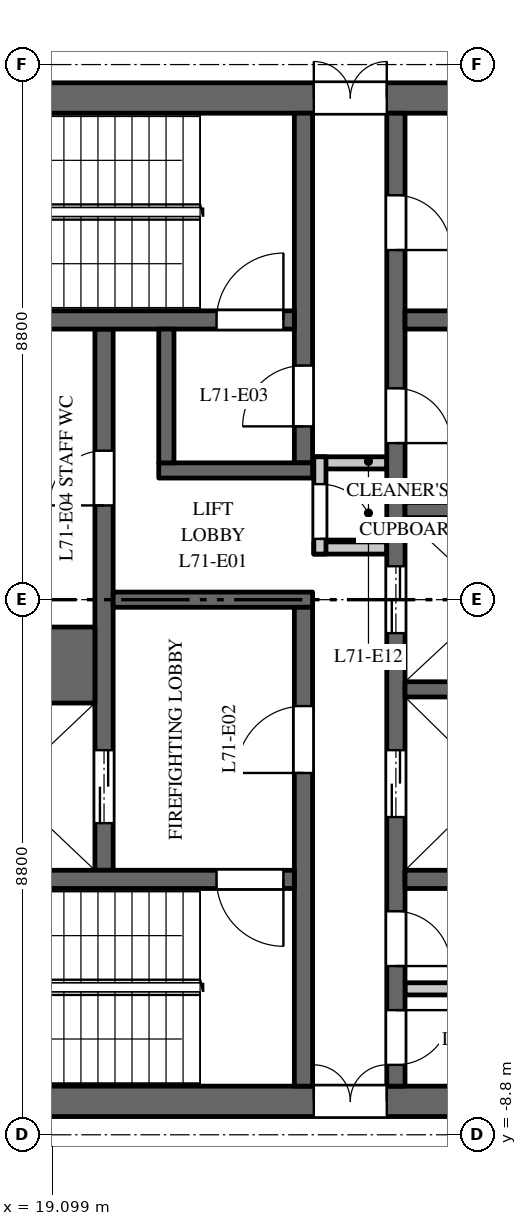
"""IFC4 building model, lengths in metres.
Left out: names, types, materials, properties, quantities, classifications, styles, units other than length and angle.
Written with IfcOpenShell. Run it as: python <this file> out.ifc"""

import sys

from ifc_helpers import new_model, si_unit, direction, frame, frame_2d, origin, place, context, subcontext, project, spatial, rectangle, extrude, element, fill, save


model = new_model("IFC4")
c1 = context("Model", 3, precision=1e-05, world=origin(), true_north=direction((0.0, 1.0)))
c2 = subcontext(c1, "Body", "Model", "MODEL_VIEW")
j1 = project(units=[si_unit("LENGTHUNIT", "METRE"), si_unit("PLANEANGLEUNIT", "RADIAN")], contexts=[c1])
p1 = place(None, origin())
s1 = spatial("IfcSite", under=j1, at=p1, CompositionType="ELEMENT")
p2 = place(p1, origin())
s2 = spatial("IfcBuilding", under=s1, at=p2, CompositionType="ELEMENT")
p3 = place(p2, frame((0.0, 0.0, 327.0)))
s3 = spatial("IfcBuildingStorey", under=s2, at=p3, CompositionType="ELEMENT", Elevation=327.0)
p4 = place(p3, frame((16.5, 8.25, 0.0), z_axis=(0.0, 0.0, 1.0), x_axis=(1.0, 0.0, 0.0)))
e1 = element("IfcWall", 1, at=p4, inside=s3, PredefinedType="SHEAR", context=c2, shape_type="SweptSolid", body=[
    extrude(rectangle(XDim=15.0, YDim=0.5, at=frame_2d((7.5, 0.0))), origin(), (0.0, 0.0, 1.0), 3.7),
])
p5 = place(p4, frame((6.9, 0.0, 0.0)))
e2 = element("IfcOpeningElement", 2, at=p5, cuts=e1, PredefinedType="OPENING", context=c2, shape_type="SweptSolid", body=[
    extrude(rectangle(XDim=1.2, YDim=2.1, at=frame_2d((0.6, 1.05))), frame((0.0, 0.26, 0.0), z_axis=(0.0, -1.0, 0.0), x_axis=(1.0, 0.0, 0.0)), (0.0, 0.0, 1.0), 0.52),
])
p6 = place(p4, frame((12.95, 0.0, 0.0)))
e3 = element("IfcOpeningElement", 3, at=p6, cuts=e1, PredefinedType="OPENING", context=c2, shape_type="SweptSolid", body=[
    extrude(rectangle(XDim=0.9, YDim=2.1, at=frame_2d((0.45, 1.05))), frame((0.0, 0.26, 0.0), z_axis=(0.0, -1.0, 0.0), x_axis=(1.0, 0.0, 0.0)), (0.0, 0.0, 1.0), 0.52),
])
p7 = place(p3, frame((16.5, -8.25, 0.0), z_axis=(0.0, 0.0, 1.0), x_axis=(1.0, 0.0, 0.0)))
e4 = element("IfcWall", 4, at=p7, inside=s3, PredefinedType="SHEAR", context=c2, shape_type="SweptSolid", body=[
    extrude(rectangle(XDim=15.0, YDim=0.5, at=frame_2d((7.5, 0.0))), origin(), (0.0, 0.0, 1.0), 3.7),
])
p8 = place(p7, frame((6.9, 0.0, 0.0)))
e5 = element("IfcOpeningElement", 5, at=p8, cuts=e4, PredefinedType="OPENING", context=c2, shape_type="SweptSolid", body=[
    extrude(rectangle(XDim=1.2, YDim=2.1, at=frame_2d((0.6, 1.05))), frame((0.0, 0.26, 0.0), z_axis=(0.0, -1.0, 0.0), x_axis=(1.0, 0.0, 0.0)), (0.0, 0.0, 1.0), 0.52),
])
p9 = place(p7, frame((12.275, 0.0, 0.0)))
e6 = element("IfcOpeningElement", 6, at=p9, cuts=e4, PredefinedType="OPENING", context=c2, shape_type="SweptSolid", body=[
    extrude(rectangle(XDim=0.9, YDim=2.1, at=frame_2d((0.45, 1.05))), frame((0.0, 0.26, 0.0), z_axis=(0.0, -1.0, 0.0), x_axis=(1.0, 0.0, 0.0)), (0.0, 0.0, 1.0), 0.52),
])
p10 = place(p3, frame((19.95, -4.45, 0.0), z_axis=(0.0, 0.0, 1.0), x_axis=(0.0, 1.0, 0.0)))
e7 = element("IfcWall", 7, at=p10, inside=s3, PredefinedType="SHEAR", context=c2, shape_type="SweptSolid", body=[
    extrude(rectangle(XDim=8.9, YDim=0.3, at=frame_2d((4.45, 0.0))), origin(), (0.0, 0.0, 1.0), 3.7),
])
p11 = place(p10, frame((0.775, 0.0, 0.0)))
e8 = element("IfcOpeningElement", 8, at=p11, cuts=e7, PredefinedType="OPENING", context=c2, shape_type="SweptSolid", body=[
    extrude(rectangle(XDim=1.2, YDim=2.1, at=frame_2d((0.6, 1.05))), frame((0.0, 0.16, 0.0), z_axis=(0.0, -1.0, 0.0), x_axis=(1.0, 0.0, 0.0)), (0.0, 0.0, 1.0), 0.32),
])
p12 = place(p10, frame((6.0, 0.0, 0.0)))
e9 = element("IfcOpeningElement", 9, at=p12, cuts=e7, PredefinedType="OPENING", context=c2, shape_type="SweptSolid", body=[
    extrude(rectangle(XDim=0.9, YDim=2.1, at=frame_2d((0.45, 1.05))), frame((0.0, 0.16, 0.0), z_axis=(0.0, -1.0, 0.0), x_axis=(1.0, 0.0, 0.0)), (0.0, 0.0, 1.0), 0.32),
])
p13 = place(p3, frame((24.75, -8.0, 0.0), z_axis=(0.0, 0.0, 1.0), x_axis=(0.0, 1.0, 0.0)))
e10 = element("IfcWall", 10, at=p13, inside=s3, PredefinedType="SHEAR", context=c2, shape_type="SweptSolid", body=[
    extrude(rectangle(XDim=16.0, YDim=0.3, at=frame_2d((8.0, 0.0))), origin(), (0.0, 0.0, 1.0), 3.7),
])
p14 = place(p13, frame((4.425, 0.0, 0.0)))
e11 = element("IfcOpeningElement", 11, at=p14, cuts=e10, PredefinedType="OPENING", context=c2, shape_type="SweptSolid", body=[
    extrude(rectangle(XDim=1.1, YDim=2.1, at=frame_2d((0.55, 1.05))), frame((0.0, 0.16, 0.0), z_axis=(0.0, -1.0, 0.0), x_axis=(1.0, 0.0, 0.0)), (0.0, 0.0, 1.0), 0.32),
])
p15 = place(p13, frame((7.45, 0.0, 0.0)))
e12 = element("IfcOpeningElement", 12, at=p15, cuts=e10, PredefinedType="OPENING", context=c2, shape_type="SweptSolid", body=[
    extrude(rectangle(XDim=1.1, YDim=2.1, at=frame_2d((0.55, 1.05))), frame((0.0, 0.16, 0.0), z_axis=(0.0, -1.0, 0.0), x_axis=(1.0, 0.0, 0.0)), (0.0, 0.0, 1.0), 0.32),
])
p16 = place(p13, frame((10.575, 0.0, 0.0)))
e13 = element("IfcOpeningElement", 13, at=p16, cuts=e10, PredefinedType="OPENING", context=c2, shape_type="SweptSolid", body=[
    extrude(rectangle(XDim=0.9, YDim=2.1, at=frame_2d((0.45, 1.05))), frame((0.0, 0.16, 0.0), z_axis=(0.0, -1.0, 0.0), x_axis=(1.0, 0.0, 0.0)), (0.0, 0.0, 1.0), 0.32),
])
p17 = place(p13, frame((13.75, 0.0, 0.0)))
e14 = element("IfcOpeningElement", 14, at=p17, cuts=e10, PredefinedType="OPENING", context=c2, shape_type="SweptSolid", body=[
    extrude(rectangle(XDim=0.9, YDim=2.1, at=frame_2d((0.45, 1.05))), frame((0.0, 0.16, 0.0), z_axis=(0.0, -1.0, 0.0), x_axis=(1.0, 0.0, 0.0)), (0.0, 0.0, 1.0), 0.32),
])
p18 = place(p13, frame((1.975, 0.0, 0.0)))
e15 = element("IfcOpeningElement", 15, at=p18, cuts=e10, PredefinedType="OPENING", context=c2, shape_type="SweptSolid", body=[
    extrude(rectangle(XDim=0.9, YDim=2.1, at=frame_2d((0.45, 1.05))), frame((0.0, 0.16, 0.0), z_axis=(0.0, -1.0, 0.0), x_axis=(1.0, 0.0, 0.0)), (0.0, 0.0, 1.0), 0.32),
])
p19 = place(p13, frame((0.35, 0.0, 0.0)))
e16 = element("IfcOpeningElement", 16, at=p19, cuts=e10, PredefinedType="OPENING", context=c2, shape_type="SweptSolid", body=[
    extrude(rectangle(XDim=0.9, YDim=2.1, at=frame_2d((0.45, 1.05))), frame((0.0, 0.16, 0.0), z_axis=(0.0, -1.0, 0.0), x_axis=(1.0, 0.0, 0.0)), (0.0, 0.0, 1.0), 0.32),
])
p20 = place(p3, frame((20.1, 0.0, 0.0), z_axis=(0.0, 0.0, 1.0), x_axis=(1.0, 0.0, 0.0)))
e17 = element("IfcWall", 17, at=p20, inside=s3, PredefinedType="SHEAR", context=c2, shape_type="SweptSolid", body=[
    extrude(rectangle(XDim=3.28, YDim=0.25, at=frame_2d((1.64, 0.0))), origin(), (0.0, 0.0, 1.0), 3.7),
])
for number, where, z_axis, x_axis in (
    (18, (23.4, 0.85, 0.0), (0.0, 0.0, 1.0), (1.0, 0.0, 0.0)),
    (19, (23.4, 2.25, 0.0), (0.0, 0.0, 1.0), (1.0, 0.0, 0.0)),
):
    element("IfcWall", number, at=place(p3, frame(where, z_axis=z_axis, x_axis=x_axis)), inside=s3, PredefinedType="PARTITIONING", context=c2, shape_type="SweptSolid", body=[
        extrude(rectangle(XDim=1.2, YDim=0.2, at=frame_2d((0.6, 0.0))), origin(), (0.0, 0.0, 1.0), 3.7),
    ])
p21 = place(p3, frame((23.5, 0.75, 0.0), z_axis=(0.0, 0.0, 1.0), x_axis=(0.0, 1.0, 0.0)))
e20 = element("IfcWall", 20, at=p21, inside=s3, PredefinedType="PARTITIONING", context=c2, shape_type="SweptSolid", body=[
    extrude(rectangle(XDim=1.6, YDim=0.2, at=frame_2d((0.8, 0.0))), origin(), (0.0, 0.0, 1.0), 3.7),
])
p22 = place(p21, frame((0.25, 0.0, 0.0)))
e21 = element("IfcOpeningElement", 21, at=p22, cuts=e20, PredefinedType="OPENING", context=c2, shape_type="SweptSolid", body=[
    extrude(rectangle(XDim=0.9, YDim=2.1, at=frame_2d((0.45, 1.05))), frame((0.0, 0.11, 0.0), z_axis=(0.0, -1.0, 0.0), x_axis=(1.0, 0.0, 0.0)), (0.0, 0.0, 1.0), 0.22),
])
p23 = place(p3, frame((24.9, 4.6, 0.0), z_axis=(0.0, 0.0, 1.0), x_axis=(1.0, 0.0, 0.0)))
e22 = element("IfcWall", 22, at=p23, inside=s3, PredefinedType="SHEAR", context=c2, shape_type="SweptSolid", body=[
    extrude(rectangle(XDim=6.1, YDim=0.3, at=frame_2d((3.05, 0.0))), origin(), (0.0, 0.0, 1.0), 3.7),
])
p24 = place(p3, frame((24.9, -6.4, 0.0), z_axis=(0.0, 0.0, 1.0), x_axis=(1.0, 0.0, 0.0)))
e23 = element("IfcWall", 23, at=p24, inside=s3, PredefinedType="PARTITIONING", context=c2, shape_type="SweptSolid", body=[
    extrude(rectangle(XDim=2.35, YDim=0.2, at=frame_2d((1.175, 0.0))), origin(), (0.0, 0.0, 1.0), 3.7),
])
p25 = place(p3, frame((24.9, -4.6, 0.0), z_axis=(0.0, 0.0, 1.0), x_axis=(1.0, 0.0, 0.0)))
e24 = element("IfcWall", 24, at=p25, inside=s3, PredefinedType="SHEAR", context=c2, shape_type="SweptSolid", body=[
    extrude(rectangle(XDim=6.1, YDim=0.3, at=frame_2d((3.05, 0.0))), origin(), (0.0, 0.0, 1.0), 3.7),
])
p26 = place(p25, frame((4.2, 0.0, 0.0)))
e25 = element("IfcOpeningElement", 25, at=p26, cuts=e24, PredefinedType="OPENING", context=c2, shape_type="SweptSolid", body=[
    extrude(rectangle(XDim=0.9, YDim=2.1, at=frame_2d((0.45, 1.05))), frame((0.0, 0.16, 0.0), z_axis=(0.0, -1.0, 0.0), x_axis=(1.0, 0.0, 0.0)), (0.0, 0.0, 1.0), 0.32),
])
p27 = place(p3, frame((16.9, -1.075, 0.0), z_axis=(0.0, 0.0, 1.0), x_axis=(1.0, 0.0, 0.0)))
e26 = element("IfcWall", 26, at=p27, inside=s3, PredefinedType="SHEAR", context=c2, shape_type="SweptSolid", body=[
    extrude(rectangle(XDim=2.9, YDim=1.25, at=frame_2d((1.45, 0.0))), origin(), (0.0, 0.0, 1.0), 3.7),
])
for number, where, z_axis, x_axis in (
    (27, (24.9, -1.475, 0.0), (0.0, 0.0, 1.0), (1.0, 0.0, 0.0)),
    (28, (24.9, 1.475, 0.0), (0.0, 0.0, 1.0), (1.0, 0.0, 0.0)),
):
    element("IfcWall", number, at=place(p3, frame(where, z_axis=z_axis, x_axis=x_axis)), inside=s3, PredefinedType="SHEAR", context=c2, shape_type="SweptSolid", body=[
        extrude(rectangle(XDim=2.9, YDim=0.25, at=frame_2d((1.45, 0.0))), origin(), (0.0, 0.0, 1.0), 3.7),
    ])
p28 = place(p3, frame((23.23, 2.25, 0.0), z_axis=(0.0, 0.0, 1.0), x_axis=(0.0, 1.0, 0.0)))
e29 = element("IfcWall", 29, at=p28, inside=s3, PredefinedType="SHEAR", context=c2, shape_type="SweptSolid", body=[
    extrude(rectangle(XDim=5.75, YDim=0.3, at=frame_2d((2.875, 0.0))), origin(), (0.0, 0.0, 1.0), 3.7),
])
p29 = place(p28, frame((0.6, 0.0, 0.0)))
e30 = element("IfcOpeningElement", 30, at=p29, cuts=e29, PredefinedType="OPENING", context=c2, shape_type="SweptSolid", body=[
    extrude(rectangle(XDim=1.0, YDim=2.1, at=frame_2d((0.5, 1.05))), frame((0.0, 0.16, 0.0), z_axis=(0.0, -1.0, 0.0), x_axis=(1.0, 0.0, 0.0)), (0.0, 0.0, 1.0), 0.32),
])
p30 = place(p3, frame((23.23, -8.0, 0.0), z_axis=(0.0, 0.0, 1.0), x_axis=(0.0, 1.0, 0.0)))
e31 = element("IfcWall", 31, at=p30, inside=s3, PredefinedType="SHEAR", context=c2, shape_type="SweptSolid", body=[
    extrude(rectangle(XDim=7.875, YDim=0.3, at=frame_2d((3.938, 0.0))), origin(), (0.0, 0.0, 1.0), 3.7),
])
p31 = place(p30, frame((5.15, 0.0, 0.0)))
e32 = element("IfcOpeningElement", 32, at=p31, cuts=e31, PredefinedType="OPENING", context=c2, shape_type="SweptSolid", body=[
    extrude(rectangle(XDim=1.1, YDim=2.1, at=frame_2d((0.55, 1.05))), frame((0.0, 0.16, 0.0), z_axis=(0.0, -1.0, 0.0), x_axis=(1.0, 0.0, 0.0)), (0.0, 0.0, 1.0), 0.32),
])
p32 = place(p3, frame((16.9, 4.6, 0.0), z_axis=(0.0, 0.0, 1.0), x_axis=(1.0, 0.0, 0.0)))
e33 = element("IfcWall", 33, at=p32, inside=s3, PredefinedType="SHEAR", context=c2, shape_type="SweptSolid", body=[
    extrude(rectangle(XDim=6.18, YDim=0.3, at=frame_2d((3.09, 0.0))), origin(), (0.0, 0.0, 1.0), 3.7),
])
p33 = place(p32, frame((4.9, 0.0, 0.0)))
e34 = element("IfcOpeningElement", 34, at=p33, cuts=e33, PredefinedType="OPENING", context=c2, shape_type="SweptSolid", body=[
    extrude(rectangle(XDim=1.1, YDim=2.1, at=frame_2d((0.55, 1.05))), frame((0.0, 0.16, 0.0), z_axis=(0.0, -1.0, 0.0), x_axis=(1.0, 0.0, 0.0)), (0.0, 0.0, 1.0), 0.32),
])
p34 = place(p3, frame((16.9, -4.6, 0.0), z_axis=(0.0, 0.0, 1.0), x_axis=(1.0, 0.0, 0.0)))
e35 = element("IfcWall", 35, at=p34, inside=s3, PredefinedType="SHEAR", context=c2, shape_type="SweptSolid", body=[
    extrude(rectangle(XDim=6.18, YDim=0.3, at=frame_2d((3.09, 0.0))), origin(), (0.0, 0.0, 1.0), 3.7),
])
p35 = place(p34, frame((4.9, 0.0, 0.0)))
e36 = element("IfcOpeningElement", 36, at=p35, cuts=e35, PredefinedType="OPENING", context=c2, shape_type="SweptSolid", body=[
    extrude(rectangle(XDim=1.1, YDim=2.1, at=frame_2d((0.55, 1.05))), frame((0.0, 0.16, 0.0), z_axis=(0.0, -1.0, 0.0), x_axis=(1.0, 0.0, 0.0)), (0.0, 0.0, 1.0), 0.32),
])
p36 = place(p3, frame((20.85, 2.125, 0.0), z_axis=(0.0, 0.0, 1.0), x_axis=(1.0, 0.0, 0.0)))
e37 = element("IfcWall", 37, at=p36, inside=s3, PredefinedType="SHEAR", context=c2, shape_type="SweptSolid", body=[
    extrude(rectangle(XDim=2.53, YDim=0.25, at=frame_2d((1.265, 0.0))), origin(), (0.0, 0.0, 1.0), 3.7),
])
p37 = place(p3, frame((20.975, 2.25, 0.0), z_axis=(0.0, 0.0, 1.0), x_axis=(0.0, 1.0, 0.0)))
e38 = element("IfcWall", 38, at=p37, inside=s3, PredefinedType="SHEAR", context=c2, shape_type="SweptSolid", body=[
    extrude(rectangle(XDim=2.2, YDim=0.25, at=frame_2d((1.1, 0.0))), origin(), (0.0, 0.0, 1.0), 3.7),
])
p38 = place(p11, origin())
e39 = element("IfcDoor", 39, at=p38, inside=s3, OperationType="DOUBLE_DOOR_SLIDING", PredefinedType="DOOR", context=c2, shape_type="SweptSolid", body=[
    extrude(rectangle(XDim=1.2, YDim=2.1, at=frame_2d((0.6, 1.05))), frame((0.0, 0.025, 0.0), z_axis=(0.0, -1.0, 0.0), x_axis=(1.0, 0.0, 0.0)), (0.0, 0.0, 1.0), 0.05),
])
fill(e8, e39)
p39 = place(p14, origin())
e40 = element("IfcDoor", 40, at=p39, inside=s3, OperationType="DOUBLE_DOOR_SLIDING", PredefinedType="DOOR", context=c2, shape_type="SweptSolid", body=[
    extrude(rectangle(XDim=1.1, YDim=2.1, at=frame_2d((0.55, 1.05))), frame((0.0, 0.025, 0.0), z_axis=(0.0, -1.0, 0.0), x_axis=(1.0, 0.0, 0.0)), (0.0, 0.0, 1.0), 0.05),
])
fill(e11, e40)
p40 = place(p15, origin())
e41 = element("IfcDoor", 41, at=p40, inside=s3, OperationType="DOUBLE_DOOR_SLIDING", PredefinedType="DOOR", context=c2, shape_type="SweptSolid", body=[
    extrude(rectangle(XDim=1.1, YDim=2.1, at=frame_2d((0.55, 1.05))), frame((0.0, 0.025, 0.0), z_axis=(0.0, -1.0, 0.0), x_axis=(1.0, 0.0, 0.0)), (0.0, 0.0, 1.0), 0.05),
])
fill(e12, e41)
p41 = place(p33, origin())
e42 = element("IfcDoor", 42, at=p41, inside=s3, OperationType="SINGLE_SWING_LEFT", PredefinedType="DOOR", context=c2, shape_type="SweptSolid", body=[
    extrude(rectangle(XDim=1.1, YDim=2.1, at=frame_2d((0.55, 1.05))), frame((0.0, 0.025, 0.0), z_axis=(0.0, -1.0, 0.0), x_axis=(1.0, 0.0, 0.0)), (0.0, 0.0, 1.0), 0.05),
])
fill(e34, e42)
p42 = place(p35, origin())
e43 = element("IfcDoor", 43, at=p42, inside=s3, OperationType="SINGLE_SWING_RIGHT", PredefinedType="DOOR", context=c2, shape_type="SweptSolid", body=[
    extrude(rectangle(XDim=1.1, YDim=2.1, at=frame_2d((0.55, 1.05))), frame((0.0, 0.025, 0.0), z_axis=(0.0, -1.0, 0.0), x_axis=(1.0, 0.0, 0.0)), (0.0, 0.0, 1.0), 0.05),
])
fill(e36, e43)
p43 = place(p31, origin())
e44 = element("IfcDoor", 44, at=p43, inside=s3, OperationType="SINGLE_SWING_RIGHT", PredefinedType="DOOR", context=c2, shape_type="SweptSolid", body=[
    extrude(rectangle(XDim=1.1, YDim=2.1, at=frame_2d((0.55, 1.05))), frame((0.0, 0.025, 0.0), z_axis=(0.0, -1.0, 0.0), x_axis=(1.0, 0.0, 0.0)), (0.0, 0.0, 1.0), 0.05),
])
fill(e32, e44)
p44 = place(p29, origin())
e45 = element("IfcDoor", 45, at=p44, inside=s3, OperationType="SINGLE_SWING_RIGHT", PredefinedType="DOOR", context=c2, shape_type="SweptSolid", body=[
    extrude(rectangle(XDim=1.0, YDim=2.1, at=frame_2d((0.5, 1.05))), frame((0.0, 0.025, 0.0), z_axis=(0.0, -1.0, 0.0), x_axis=(1.0, 0.0, 0.0)), (0.0, 0.0, 1.0), 0.05),
])
fill(e30, e45)
p45 = place(p5, origin())
e46 = element("IfcDoor", 46, at=p45, inside=s3, OperationType="DOUBLE_DOOR_DOUBLE_SWING", PredefinedType="DOOR", context=c2, shape_type="SweptSolid", body=[
    extrude(rectangle(XDim=1.2, YDim=2.1, at=frame_2d((0.6, 1.05))), frame((0.0, 0.025, 0.0), z_axis=(0.0, -1.0, 0.0), x_axis=(1.0, 0.0, 0.0)), (0.0, 0.0, 1.0), 0.05),
])
fill(e2, e46)
p46 = place(p8, origin())
e47 = element("IfcDoor", 47, at=p46, inside=s3, OperationType="DOUBLE_DOOR_DOUBLE_SWING", PredefinedType="DOOR", context=c2, shape_type="SweptSolid", body=[
    extrude(rectangle(XDim=1.2, YDim=2.1, at=frame_2d((0.6, 1.05))), frame((0.0, 0.025, 0.0), z_axis=(0.0, -1.0, 0.0), x_axis=(1.0, 0.0, 0.0)), (0.0, 0.0, 1.0), 0.05),
])
fill(e5, e47)
p47 = place(p12, origin())
e48 = element("IfcDoor", 48, at=p47, inside=s3, OperationType="SINGLE_SWING_RIGHT", PredefinedType="DOOR", context=c2, shape_type="SweptSolid", body=[
    extrude(rectangle(XDim=0.9, YDim=2.1, at=frame_2d((0.45, 1.05))), frame((0.0, 0.025, 0.0), z_axis=(0.0, -1.0, 0.0), x_axis=(1.0, 0.0, 0.0)), (0.0, 0.0, 1.0), 0.05),
])
fill(e9, e48)
p48 = place(p16, origin())
e49 = element("IfcDoor", 49, at=p48, inside=s3, OperationType="SINGLE_SWING_LEFT", PredefinedType="DOOR", context=c2, shape_type="SweptSolid", body=[
    extrude(rectangle(XDim=0.9, YDim=2.1, at=frame_2d((0.45, 1.05))), frame((0.0, 0.025, 0.0), z_axis=(0.0, -1.0, 0.0), x_axis=(1.0, 0.0, 0.0)), (0.0, 0.0, 1.0), 0.05),
])
fill(e13, e49)
p49 = place(p17, origin())
e50 = element("IfcDoor", 50, at=p49, inside=s3, OperationType="SINGLE_SWING_LEFT", PredefinedType="DOOR", context=c2, shape_type="SweptSolid", body=[
    extrude(rectangle(XDim=0.9, YDim=2.1, at=frame_2d((0.45, 1.05))), frame((0.0, 0.025, 0.0), z_axis=(0.0, -1.0, 0.0), x_axis=(1.0, 0.0, 0.0)), (0.0, 0.0, 1.0), 0.05),
])
fill(e14, e50)
p50 = place(p18, origin())
e51 = element("IfcDoor", 51, at=p50, inside=s3, OperationType="SINGLE_SWING_LEFT", PredefinedType="DOOR", context=c2, shape_type="SweptSolid", body=[
    extrude(rectangle(XDim=0.9, YDim=2.1, at=frame_2d((0.45, 1.05))), frame((0.0, 0.025, 0.0), z_axis=(0.0, -1.0, 0.0), x_axis=(1.0, 0.0, 0.0)), (0.0, 0.0, 1.0), 0.05),
])
fill(e15, e51)
p51 = place(p19, origin())
e52 = element("IfcDoor", 52, at=p51, inside=s3, OperationType="SINGLE_SWING_RIGHT", PredefinedType="DOOR", context=c2, shape_type="SweptSolid", body=[
    extrude(rectangle(XDim=0.9, YDim=2.1, at=frame_2d((0.45, 1.05))), frame((0.0, 0.025, 0.0), z_axis=(0.0, -1.0, 0.0), x_axis=(1.0, 0.0, 0.0)), (0.0, 0.0, 1.0), 0.05),
])
fill(e16, e52)
p52 = place(p22, origin())
e53 = element("IfcDoor", 53, at=p52, inside=s3, OperationType="SINGLE_SWING_LEFT", PredefinedType="DOOR", context=c2, shape_type="SweptSolid", body=[
    extrude(rectangle(XDim=0.9, YDim=2.1, at=frame_2d((0.45, 1.05))), frame((0.0, 0.025, 0.0), z_axis=(0.0, -1.0, 0.0), x_axis=(1.0, 0.0, 0.0)), (0.0, 0.0, 1.0), 0.05),
])
fill(e21, e53)
save(model, sys.argv[1])
